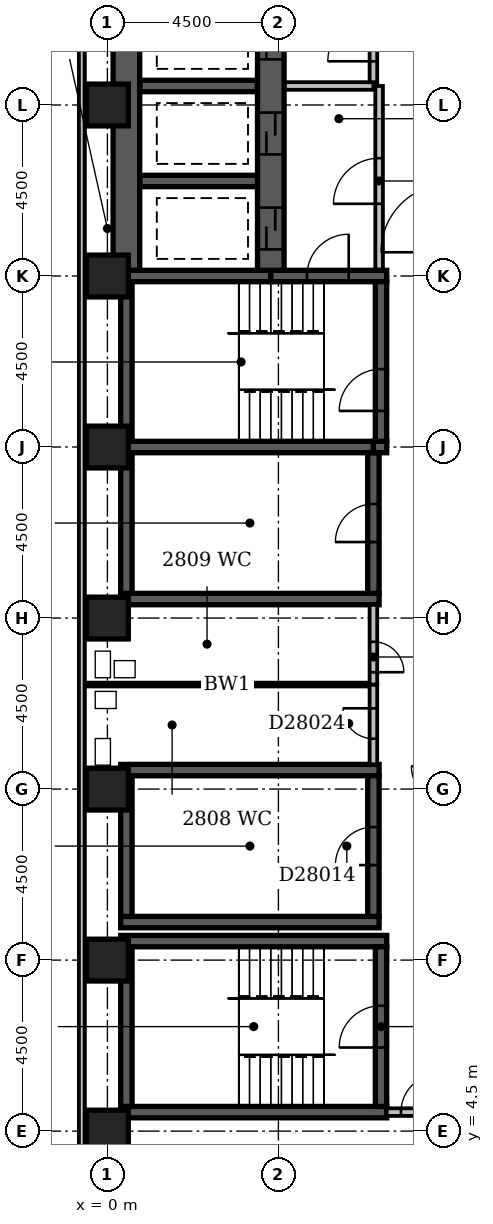
"""IFC4 building model, lengths in metres.
Left out: names, types, materials, properties, quantities, classifications, styles, units other than length and angle.
Written with IfcOpenShell. Run it as: python <this file> out.ifc"""

import sys

from ifc_helpers import new_model, si_unit, direction, frame, frame_2d, origin, origin_2d, place, context, subcontext, project, spatial, rectangle, extrude, element, fill, save


model = new_model("IFC4")
c1 = context("Model", 3, precision=1e-05, world=origin(), true_north=direction((0.0, 1.0)))
c2 = subcontext(c1, "Body", "Model", "MODEL_VIEW")
j1 = project(units=[si_unit("LENGTHUNIT", "METRE"), si_unit("PLANEANGLEUNIT", "RADIAN")], contexts=[c1])
p1 = place(None, origin())
s1 = spatial("IfcSite", under=j1, at=p1, CompositionType="ELEMENT")
p2 = place(p1, origin())
s2 = spatial("IfcBuilding", under=s1, at=p2, CompositionType="ELEMENT")
p3 = place(p2, frame((0.0, 0.0, 113.6)))
s3 = spatial("IfcBuildingStorey", under=s2, at=p3, CompositionType="ELEMENT", Elevation=113.6)
for number, where, z_axis, x_axis in (
    (1, (0.35, 5.0, -0.5), (0.0, 0.0, 1.0), (1.0, 0.0, 0.0)),
    (2, (0.35, 9.5, -0.5), (0.0, 0.0, 1.0), (1.0, 0.0, 0.0)),
):
    element("IfcWall", number, at=place(p3, frame(where, z_axis=z_axis, x_axis=x_axis)), inside=s3, PredefinedType="SHEAR", context=c2, shape_type="SweptSolid", body=[
        extrude(rectangle(XDim=7.0, YDim=0.3, at=frame_2d((3.5, 0.0))), origin(), (0.0, 0.0, 1.0), 6.2),
    ])
for number, where, z_axis, x_axis in (
    (3, (0.35, 10.0, -0.5), (0.0, 0.0, 1.0), (1.0, 0.0, 0.0)),
    (4, (0.35, 14.0, -0.5), (0.0, 0.0, 1.0), (1.0, 0.0, 0.0)),
    (5, (0.35, 18.5, -0.5), (0.0, 0.0, 1.0), (1.0, 0.0, 0.0)),
):
    element("IfcWall", number, at=place(p3, frame(where, z_axis=z_axis, x_axis=x_axis)), inside=s3, PredefinedType="SHEAR", context=c2, shape_type="SweptSolid", body=[
        extrude(rectangle(XDim=6.8, YDim=0.3, at=frame_2d((3.4, 0.0))), origin(), (0.0, 0.0, 1.0), 6.2),
    ])
p4 = place(p3, frame((0.35, 22.5, -0.5), z_axis=(0.0, 0.0, 1.0), x_axis=(1.0, 0.0, 0.0)))
e6 = element("IfcWall", 6, at=p4, inside=s3, PredefinedType="SHEAR", context=c2, shape_type="SweptSolid", body=[
    extrude(rectangle(XDim=6.65, YDim=0.3, at=frame_2d((3.325, 0.0))), origin(), (0.0, 0.0, 1.0), 6.2),
])
p5 = place(p3, frame((0.35, 27.0, -0.5), z_axis=(0.0, 0.0, 1.0), x_axis=(1.0, 0.0, 0.0)))
e7 = element("IfcWall", 7, at=p5, inside=s3, PredefinedType="SHEAR", context=c2, shape_type="SweptSolid", body=[
    extrude(rectangle(XDim=3.95, YDim=0.3, at=frame_2d((1.975, 0.0))), origin(), (0.0, 0.0, 1.0), 6.2),
])
p6 = place(p3, frame((0.5, 5.15, -0.5), z_axis=(0.0, 0.0, 1.0), x_axis=(0.0, 1.0, 0.0)))
e8 = element("IfcWall", 8, at=p6, inside=s3, PredefinedType="SHEAR", context=c2, shape_type="SweptSolid", body=[
    extrude(rectangle(XDim=4.2, YDim=0.3, at=frame_2d((2.1, 0.0))), origin(), (0.0, 0.0, 1.0), 6.2),
])
for number, where, z_axis, x_axis in (
    (9, (0.5, 10.15, -0.5), (0.0, 0.0, 1.0), (0.0, 1.0, 0.0)),
    (10, (0.5, 18.65, -0.5), (0.0, 0.0, 1.0), (0.0, 1.0, 0.0)),
):
    element("IfcWall", number, at=place(p3, frame(where, z_axis=z_axis, x_axis=x_axis)), inside=s3, PredefinedType="SHEAR", context=c2, shape_type="SweptSolid", body=[
        extrude(rectangle(XDim=3.7, YDim=0.3, at=frame_2d((1.85, 0.0))), origin(), (0.0, 0.0, 1.0), 6.2),
    ])
p7 = place(p3, frame((0.5, 22.65, -0.5), z_axis=(0.0, 0.0, 1.0), x_axis=(0.0, 1.0, 0.0)))
e11 = element("IfcWall", 11, at=p7, inside=s3, PredefinedType="SHEAR", context=c2, shape_type="SweptSolid", body=[
    extrude(rectangle(XDim=4.2, YDim=0.3, at=frame_2d((2.1, 0.0))), origin(), (0.0, 0.0, 1.0), 6.2),
])
p8 = place(p3, frame((0.5, 27.15, -0.5), z_axis=(0.0, 0.0, 1.0), x_axis=(0.0, 1.0, 0.0)))
e12 = element("IfcWall", 12, at=p8, inside=s3, PredefinedType="SHEAR", context=c2, shape_type="SweptSolid", body=[
    extrude(rectangle(XDim=22.0, YDim=0.7, at=frame_2d((11.0, 0.0))), origin(), (0.0, 0.0, 1.0), 6.2),
])
for number, where, z_axis, x_axis in (
    (13, (0.85, 29.5, -0.5), (0.0, 0.0, 1.0), (1.0, 0.0, 0.0)),
    (14, (0.85, 32.0, -0.5), (0.0, 0.0, 1.0), (1.0, 0.0, 0.0)),
):
    element("IfcWall", number, at=place(p3, frame(where, z_axis=z_axis, x_axis=x_axis)), inside=s3, PredefinedType="SHEAR", context=c2, shape_type="SweptSolid", body=[
        extrude(rectangle(XDim=3.1, YDim=0.3, at=frame_2d((1.55, 0.0))), origin(), (0.0, 0.0, 1.0), 6.2),
    ])
p9 = place(p3, frame((4.3, 27.0, -0.5), z_axis=(0.0, 0.0, 1.0), x_axis=(1.0, 0.0, 0.0)))
e15 = element("IfcWall", 15, at=p9, inside=s3, PredefinedType="SHEAR", context=c2, shape_type="SweptSolid", body=[
    extrude(rectangle(XDim=3.05, YDim=0.3, at=frame_2d((1.525, 0.0))), origin(), (0.0, 0.0, 1.0), 6.2),
])
p10 = place(p9, frame((0.95, 0.0, 0.5)))
e16 = element("IfcOpeningElement", 16, at=p10, cuts=e15, PredefinedType="OPENING", context=c2, shape_type="SweptSolid", body=[
    extrude(rectangle(XDim=1.1, YDim=2.1, at=frame_2d((0.55, 1.05))), frame((0.0, 0.162, 0.0), z_axis=(0.0, -1.0, 0.0), x_axis=(1.0, 0.0, 0.0)), (0.0, 0.0, 1.0), 0.324),
])
p11 = place(p3, frame((4.3, 27.15, -0.5), z_axis=(0.0, 0.0, 1.0), x_axis=(0.0, 1.0, 0.0)))
e17 = element("IfcWall", 17, at=p11, inside=s3, PredefinedType="SHEAR", context=c2, shape_type="SweptSolid", body=[
    extrude(rectangle(XDim=22.0, YDim=0.7, at=frame_2d((11.0, 0.0))), origin(), (0.0, 0.0, 1.0), 6.2),
])
p12 = place(p11, frame((3.05, 0.0, 0.5)))
e18 = element("IfcOpeningElement", 18, at=p12, cuts=e17, PredefinedType="OPENING", context=c2, shape_type="SweptSolid", body=[
    extrude(rectangle(XDim=1.1, YDim=2.1, at=frame_2d((0.55, 1.05))), frame((0.0, 0.362, 0.0), z_axis=(0.0, -1.0, 0.0), x_axis=(1.0, 0.0, 0.0)), (0.0, 0.0, 1.0), 0.724),
])
p13 = place(p11, frame((0.55, 0.0, 0.5)))
e19 = element("IfcOpeningElement", 19, at=p13, cuts=e17, PredefinedType="OPENING", context=c2, shape_type="SweptSolid", body=[
    extrude(rectangle(XDim=1.1, YDim=2.1, at=frame_2d((0.55, 1.05))), frame((0.0, 0.362, 0.0), z_axis=(0.0, -1.0, 0.0), x_axis=(1.0, 0.0, 0.0)), (0.0, 0.0, 1.0), 0.724),
])
p14 = place(p11, frame((20.45, 0.0, 0.5)))
e20 = element("IfcOpeningElement", 20, at=p14, cuts=e17, PredefinedType="OPENING", context=c2, shape_type="SweptSolid", body=[
    extrude(rectangle(XDim=1.1, YDim=2.1, at=frame_2d((0.55, 1.05))), frame((0.0, 0.362, 0.0), z_axis=(0.0, -1.0, 0.0), x_axis=(1.0, 0.0, 0.0)), (0.0, 0.0, 1.0), 0.724),
])
p15 = place(p11, frame((18.05, 0.0, 0.5)))
e21 = element("IfcOpeningElement", 21, at=p15, cuts=e17, PredefinedType="OPENING", context=c2, shape_type="SweptSolid", body=[
    extrude(rectangle(XDim=1.1, YDim=2.1, at=frame_2d((0.55, 1.05))), frame((0.0, 0.362, 0.0), z_axis=(0.0, -1.0, 0.0), x_axis=(1.0, 0.0, 0.0)), (0.0, 0.0, 1.0), 0.724),
])
p16 = place(p11, frame((15.55, 0.0, 0.5)))
e22 = element("IfcOpeningElement", 22, at=p16, cuts=e17, PredefinedType="OPENING", context=c2, shape_type="SweptSolid", body=[
    extrude(rectangle(XDim=1.1, YDim=2.1, at=frame_2d((0.55, 1.05))), frame((0.0, 0.362, 0.0), z_axis=(0.0, -1.0, 0.0), x_axis=(1.0, 0.0, 0.0)), (0.0, 0.0, 1.0), 0.724),
])
p17 = place(p11, frame((13.05, 0.0, 0.5)))
e23 = element("IfcOpeningElement", 23, at=p17, cuts=e17, PredefinedType="OPENING", context=c2, shape_type="SweptSolid", body=[
    extrude(rectangle(XDim=1.1, YDim=2.1, at=frame_2d((0.55, 1.05))), frame((0.0, 0.362, 0.0), z_axis=(0.0, -1.0, 0.0), x_axis=(1.0, 0.0, 0.0)), (0.0, 0.0, 1.0), 0.724),
])
p18 = place(p11, frame((10.55, 0.0, 0.5)))
e24 = element("IfcOpeningElement", 24, at=p18, cuts=e17, PredefinedType="OPENING", context=c2, shape_type="SweptSolid", body=[
    extrude(rectangle(XDim=1.1, YDim=2.1, at=frame_2d((0.55, 1.05))), frame((0.0, 0.362, 0.0), z_axis=(0.0, -1.0, 0.0), x_axis=(1.0, 0.0, 0.0)), (0.0, 0.0, 1.0), 0.724),
])
p19 = place(p11, frame((8.05, 0.0, 0.5)))
e25 = element("IfcOpeningElement", 25, at=p19, cuts=e17, PredefinedType="OPENING", context=c2, shape_type="SweptSolid", body=[
    extrude(rectangle(XDim=1.1, YDim=2.1, at=frame_2d((0.55, 1.05))), frame((0.0, 0.362, 0.0), z_axis=(0.0, -1.0, 0.0), x_axis=(1.0, 0.0, 0.0)), (0.0, 0.0, 1.0), 0.724),
])
p20 = place(p11, frame((5.55, 0.0, 0.5)))
e26 = element("IfcOpeningElement", 26, at=p20, cuts=e17, PredefinedType="OPENING", context=c2, shape_type="SweptSolid", body=[
    extrude(rectangle(XDim=1.1, YDim=2.1, at=frame_2d((0.55, 1.05))), frame((0.0, 0.362, 0.0), z_axis=(0.0, -1.0, 0.0), x_axis=(1.0, 0.0, 0.0)), (0.0, 0.0, 1.0), 0.724),
])
p21 = place(p3, frame((7.0, 10.15, -0.5), z_axis=(0.0, 0.0, 1.0), x_axis=(0.0, 1.0, 0.0)))
e27 = element("IfcWall", 27, at=p21, inside=s3, PredefinedType="SHEAR", context=c2, shape_type="SweptSolid", body=[
    extrude(rectangle(XDim=3.7, YDim=0.3, at=frame_2d((1.85, 0.0))), origin(), (0.0, 0.0, 1.0), 6.2),
])
p22 = place(p21, frame((1.35, 0.0, 0.5)))
e28 = element("IfcOpeningElement", 28, at=p22, cuts=e27, PredefinedType="OPENING", context=c2, shape_type="SweptSolid", body=[
    extrude(rectangle(XDim=1.0, YDim=2.1, at=frame_2d((0.5, 1.05))), frame((0.0, 0.162, 0.0), z_axis=(0.0, -1.0, 0.0), x_axis=(1.0, 0.0, 0.0)), (0.0, 0.0, 1.0), 0.324),
])
p23 = place(p3, frame((7.0, 18.65, -0.5), z_axis=(0.0, 0.0, 1.0), x_axis=(0.0, 1.0, 0.0)))
e29 = element("IfcWall", 29, at=p23, inside=s3, PredefinedType="SHEAR", context=c2, shape_type="SweptSolid", body=[
    extrude(rectangle(XDim=3.7, YDim=0.3, at=frame_2d((1.85, 0.0))), origin(), (0.0, 0.0, 1.0), 6.2),
])
p24 = place(p23, frame((1.35, 0.0, 0.5)))
e30 = element("IfcOpeningElement", 30, at=p24, cuts=e29, PredefinedType="OPENING", context=c2, shape_type="SweptSolid", body=[
    extrude(rectangle(XDim=1.0, YDim=2.1, at=frame_2d((0.5, 1.05))), frame((0.0, 0.162, 0.0), z_axis=(0.0, -1.0, 0.0), x_axis=(1.0, 0.0, 0.0)), (0.0, 0.0, 1.0), 0.324),
])
p25 = place(p3, frame((7.0, 22.5, -0.5), z_axis=(0.0, 0.0, 1.0), x_axis=(1.0, 0.0, 0.0)))
e31 = element("IfcWall", 31, at=p25, inside=s3, PredefinedType="SHEAR", context=c2, shape_type="SweptSolid", body=[
    extrude(rectangle(XDim=0.35, YDim=0.3, at=frame_2d((0.175, 0.0))), origin(), (0.0, 0.0, 1.0), 6.2),
])
p26 = place(p3, frame((7.2, 5.15, -0.5), z_axis=(0.0, 0.0, 1.0), x_axis=(0.0, 1.0, 0.0)))
e32 = element("IfcWall", 32, at=p26, inside=s3, PredefinedType="SHEAR", context=c2, shape_type="SweptSolid", body=[
    extrude(rectangle(XDim=4.2, YDim=0.3, at=frame_2d((2.1, 0.0))), origin(), (0.0, 0.0, 1.0), 6.2),
])
p27 = place(p26, frame((1.55, 0.0, 0.5)))
e33 = element("IfcOpeningElement", 33, at=p27, cuts=e32, PredefinedType="OPENING", context=c2, shape_type="SweptSolid", body=[
    extrude(rectangle(XDim=1.1, YDim=2.1, at=frame_2d((0.55, 1.05))), frame((0.0, 0.162, 0.0), z_axis=(0.0, -1.0, 0.0), x_axis=(1.0, 0.0, 0.0)), (0.0, 0.0, 1.0), 0.324),
])
p28 = place(p3, frame((7.2, 22.65, -0.5), z_axis=(0.0, 0.0, 1.0), x_axis=(0.0, 1.0, 0.0)))
e34 = element("IfcWall", 34, at=p28, inside=s3, PredefinedType="SHEAR", context=c2, shape_type="SweptSolid", body=[
    extrude(rectangle(XDim=4.2, YDim=0.3, at=frame_2d((2.1, 0.0))), origin(), (0.0, 0.0, 1.0), 6.2),
])
p29 = place(p28, frame((0.8, 0.0, 0.5)))
e35 = element("IfcOpeningElement", 35, at=p29, cuts=e34, PredefinedType="OPENING", context=c2, shape_type="SweptSolid", body=[
    extrude(rectangle(XDim=1.1, YDim=2.1, at=frame_2d((0.55, 1.05))), frame((0.0, 0.162, 0.0), z_axis=(0.0, -1.0, 0.0), x_axis=(1.0, 0.0, 0.0)), (0.0, 0.0, 1.0), 0.324),
])
for number, where, z_axis, x_axis in (
    (36, (0.0, 4.5, -0.5), (0.0, 0.0, 1.0), (1.0, 0.0, 0.0)),
    (37, (0.0, 9.0, -0.5), (0.0, 0.0, 1.0), (1.0, 0.0, 0.0)),
    (38, (0.0, 13.5, -0.5), (0.0, 0.0, 1.0), (1.0, 0.0, 0.0)),
    (39, (0.0, 18.0, -0.5), (0.0, 0.0, 1.0), (1.0, 0.0, 0.0)),
    (40, (0.0, 22.5, -0.5), (0.0, 0.0, 1.0), (1.0, 0.0, 0.0)),
    (41, (0.0, 27.0, -0.5), (0.0, 0.0, 1.0), (1.0, 0.0, 0.0)),
    (42, (0.0, 31.5, -0.5), (0.0, 0.0, 1.0), (1.0, 0.0, 0.0)),
):
    element("IfcColumn", number, at=place(p3, frame(where, z_axis=z_axis, x_axis=x_axis)), inside=s3, PredefinedType="COLUMN", context=c2, shape_type="SweptSolid", body=[
        extrude(rectangle(XDim=1.1, YDim=1.1, at=origin_2d()), origin(), (0.0, 0.0, 1.0), 6.2),
    ])
p30 = place(p3, frame((-0.675, 59.1, 0.0), z_axis=(0.0, 0.0, 1.0), x_axis=(0.0, -1.0, 0.0)))
e43 = element("IfcWall", 43, at=p30, inside=s3, PredefinedType="STANDARD", context=c2, shape_type="SweptSolid", body=[
    extrude(rectangle(XDim=55.35, YDim=0.15, at=frame_2d((27.675, 0.0))), origin(), (0.0, 0.0, 1.0), 1.1),
])
p31 = place(p3, frame((-0.675, 59.1, 1.1), z_axis=(0.0, 0.0, 1.0), x_axis=(0.0, -1.0, 0.0)))
e44 = element("IfcWall", 44, at=p31, inside=s3, PredefinedType="STANDARD", context=c2, shape_type="SweptSolid", body=[
    extrude(rectangle(XDim=55.35, YDim=0.15, at=frame_2d((27.675, 0.0))), origin(), (0.0, 0.0, 1.0), 4.0),
])
p32 = place(p3, frame((4.67, 32.0, 0.0), z_axis=(0.0, 0.0, 1.0), x_axis=(1.0, 0.0, 0.0)))
e45 = element("IfcWall", 45, at=p32, inside=s3, PredefinedType="PARTITIONING", context=c2, shape_type="SweptSolid", body=[
    extrude(rectangle(XDim=2.33, YDim=0.2, at=frame_2d((1.165, 0.0))), origin(), (0.0, 0.0, 1.0), 5.7),
])
p33 = place(p3, frame((7.0, 32.1, 0.0), z_axis=(0.0, 0.0, 1.0), x_axis=(0.0, 1.0, 0.0)))
e46 = element("IfcWall", 46, at=p33, inside=s3, PredefinedType="PARTITIONING", context=c2, shape_type="SweptSolid", body=[
    extrude(rectangle(XDim=2.3, YDim=0.2, at=frame_2d((1.15, 0.0))), origin(), (0.0, 0.0, 1.0), 5.7),
])
p34 = place(p33, frame((0.55, 0.0, 0.0)))
e47 = element("IfcOpeningElement", 47, at=p34, cuts=e46, PredefinedType="OPENING", context=c2, shape_type="SweptSolid", body=[
    extrude(rectangle(XDim=1.2, YDim=2.1, at=frame_2d((0.6, 1.05))), frame((0.0, 0.112, 0.0), z_axis=(0.0, -1.0, 0.0), x_axis=(1.0, 0.0, 0.0)), (0.0, 0.0, 1.0), 0.224),
])
p35 = place(p3, frame((7.15, 27.17, 0.0), z_axis=(0.0, 0.0, 1.0), x_axis=(0.0, 1.0, 0.0)))
e48 = element("IfcWall", 48, at=p35, inside=s3, PredefinedType="PARTITIONING", context=c2, shape_type="SweptSolid", body=[
    extrude(rectangle(XDim=4.83, YDim=0.2, at=frame_2d((2.415, 0.0))), origin(), (0.0, 0.0, 1.0), 5.7),
])
p36 = place(p35, frame((1.73, 0.0, 0.0)))
e49 = element("IfcOpeningElement", 49, at=p36, cuts=e48, PredefinedType="OPENING", context=c2, shape_type="SweptSolid", body=[
    extrude(rectangle(XDim=1.2, YDim=2.1, at=frame_2d((0.6, 1.05))), frame((0.0, 0.112, 0.0), z_axis=(0.0, -1.0, 0.0), x_axis=(1.0, 0.0, 0.0)), (0.0, 0.0, 1.0), 0.224),
])
p37 = place(p3, frame((7.35, 5.0, 0.0), z_axis=(0.0, 0.0, 1.0), x_axis=(1.0, 0.0, 0.0)))
e50 = element("IfcWall", 50, at=p37, inside=s3, PredefinedType="PARTITIONING", context=c2, shape_type="SweptSolid", body=[
    extrude(rectangle(XDim=1.75, YDim=0.2, at=frame_2d((0.875, 0.0))), origin(), (0.0, 0.0, 1.0), 5.7),
])
p38 = place(p37, frame((0.375, 0.0, 0.0)))
e51 = element("IfcOpeningElement", 51, at=p38, cuts=e50, PredefinedType="OPENING", context=c2, shape_type="SweptSolid", body=[
    extrude(rectangle(XDim=1.0, YDim=2.1, at=frame_2d((0.5, 1.05))), frame((0.0, 0.112, 0.0), z_axis=(0.0, -1.0, 0.0), x_axis=(1.0, 0.0, 0.0)), (0.0, 0.0, 1.0), 0.224),
])
p39 = place(p3, frame((-0.6, 16.25, 0.0), z_axis=(0.0, 0.0, 1.0), x_axis=(1.0, 0.0, 0.0)))
e52 = element("IfcWall", 52, at=p39, inside=s3, PredefinedType="PLUMBINGWALL", context=c2, shape_type="SweptSolid", body=[
    extrude(rectangle(XDim=7.5, YDim=0.1, at=frame_2d((3.75, 0.0))), origin(), (0.0, 0.0, 1.0), 5.7),
])
p40 = place(p3, frame((7.0, 16.25, 0.0), z_axis=(0.0, 0.0, 1.0), x_axis=(0.0, -1.0, 0.0)))
e53 = element("IfcWall", 53, at=p40, inside=s3, PredefinedType="PARTITIONING", context=c2, shape_type="SweptSolid", body=[
    extrude(rectangle(XDim=2.1, YDim=0.2, at=frame_2d((1.05, 0.0))), origin(), (0.0, 0.0, 1.0), 5.7),
])
p41 = place(p40, frame((0.625, 0.0, 0.0)))
e54 = element("IfcOpeningElement", 54, at=p41, cuts=e53, PredefinedType="OPENING", context=c2, shape_type="SweptSolid", body=[
    extrude(rectangle(XDim=0.8, YDim=2.1, at=frame_2d((0.4, 1.05))), frame((0.0, 0.112, 0.0), z_axis=(0.0, -1.0, 0.0), x_axis=(1.0, 0.0, 0.0)), (0.0, 0.0, 1.0), 0.224),
])
p42 = place(p3, frame((7.0, 18.35, 0.0), z_axis=(0.0, 0.0, 1.0), x_axis=(0.0, -1.0, 0.0)))
e55 = element("IfcWall", 55, at=p42, inside=s3, PredefinedType="PARTITIONING", context=c2, shape_type="SweptSolid", body=[
    extrude(rectangle(XDim=2.1, YDim=0.2, at=frame_2d((1.05, 0.0))), origin(), (0.0, 0.0, 1.0), 5.7),
])
p43 = place(p42, frame((0.975, 0.0, 0.0)))
e56 = element("IfcOpeningElement", 56, at=p43, cuts=e55, PredefinedType="OPENING", context=c2, shape_type="SweptSolid", body=[
    extrude(rectangle(XDim=0.8, YDim=2.1, at=frame_2d((0.4, 1.05))), frame((0.0, 0.112, 0.0), z_axis=(0.0, -1.0, 0.0), x_axis=(1.0, 0.0, 0.0)), (0.0, 0.0, 1.0), 0.224),
])
p44 = place(p36, origin())
e57 = element("IfcDoor", 57, at=p44, inside=s3, OperationType="SINGLE_SWING_LEFT", PredefinedType="DOOR", context=c2, shape_type="SweptSolid", body=[
    extrude(rectangle(XDim=1.2, YDim=2.1, at=frame_2d((0.6, 1.05))), frame((0.0, 0.025, 0.0), z_axis=(0.0, -1.0, 0.0), x_axis=(1.0, 0.0, 0.0)), (0.0, 0.0, 1.0), 0.05),
])
fill(e49, e57)
p45 = place(p12, origin())
e58 = element("IfcDoor", 58, at=p45, inside=s3, OperationType="SLIDING_TO_LEFT", PredefinedType="DOOR", context=c2, shape_type="SweptSolid", body=[
    extrude(rectangle(XDim=1.1, YDim=2.1, at=frame_2d((0.55, 1.05))), frame((0.0, 0.025, 0.0), z_axis=(0.0, -1.0, 0.0), x_axis=(1.0, 0.0, 0.0)), (0.0, 0.0, 1.0), 0.05),
])
fill(e18, e58)
p46 = place(p13, origin())
e59 = element("IfcDoor", 59, at=p46, inside=s3, OperationType="SLIDING_TO_LEFT", PredefinedType="DOOR", context=c2, shape_type="SweptSolid", body=[
    extrude(rectangle(XDim=1.1, YDim=2.1, at=frame_2d((0.55, 1.05))), frame((0.0, 0.025, 0.0), z_axis=(0.0, -1.0, 0.0), x_axis=(1.0, 0.0, 0.0)), (0.0, 0.0, 1.0), 0.05),
])
fill(e19, e59)
p47 = place(p34, origin())
e60 = element("IfcDoor", 60, at=p47, inside=s3, OperationType="SINGLE_SWING_LEFT", PredefinedType="DOOR", context=c2, shape_type="SweptSolid", body=[
    extrude(rectangle(XDim=1.2, YDim=2.1, at=frame_2d((0.6, 1.05))), frame((0.0, 0.025, 0.0), z_axis=(0.0, -1.0, 0.0), x_axis=(1.0, 0.0, 0.0)), (0.0, 0.0, 1.0), 0.05),
])
fill(e47, e60)
p48 = place(p20, origin())
e61 = element("IfcDoor", 61, at=p48, inside=s3, OperationType="SLIDING_TO_LEFT", PredefinedType="DOOR", context=c2, shape_type="SweptSolid", body=[
    extrude(rectangle(XDim=1.1, YDim=2.1, at=frame_2d((0.55, 1.05))), frame((0.0, 0.025, 0.0), z_axis=(0.0, -1.0, 0.0), x_axis=(1.0, 0.0, 0.0)), (0.0, 0.0, 1.0), 0.05),
])
fill(e26, e61)
p49 = place(p24, origin())
e62 = element("IfcDoor", 62, at=p49, inside=s3, OperationType="SINGLE_SWING_LEFT", PredefinedType="DOOR", context=c2, shape_type="SweptSolid", body=[
    extrude(rectangle(XDim=1.0, YDim=2.1, at=frame_2d((0.5, 1.05))), frame((0.0, 0.025, 0.0), z_axis=(0.0, -1.0, 0.0), x_axis=(1.0, 0.0, 0.0)), (0.0, 0.0, 1.0), 0.05),
])
fill(e30, e62)
p50 = place(p22, origin())
e63 = element("IfcDoor", 63, at=p50, inside=s3, OperationType="SINGLE_SWING_LEFT", PredefinedType="DOOR", context=c2, shape_type="SweptSolid", body=[
    extrude(rectangle(XDim=1.0, YDim=2.1, at=frame_2d((0.5, 1.05))), frame((0.0, 0.025, 0.0), z_axis=(0.0, -1.0, 0.0), x_axis=(1.0, 0.0, 0.0)), (0.0, 0.0, 1.0), 0.05),
])
fill(e28, e63)
p51 = place(p10, frame((1.1, 0.0, 0.0), z_axis=(0.0, 0.0, 1.0), x_axis=(-1.0, 0.0, 0.0)))
e64 = element("IfcDoor", 64, at=p51, inside=s3, OperationType="SINGLE_SWING_LEFT", PredefinedType="DOOR", context=c2, shape_type="SweptSolid", body=[
    extrude(rectangle(XDim=1.1, YDim=2.1, at=frame_2d((0.55, 1.05))), frame((0.0, 0.025, 0.0), z_axis=(0.0, -1.0, 0.0), x_axis=(1.0, 0.0, 0.0)), (0.0, 0.0, 1.0), 0.05),
])
fill(e16, e64)
p52 = place(p29, origin())
e65 = element("IfcDoor", 65, at=p52, inside=s3, OperationType="SINGLE_SWING_LEFT", PredefinedType="DOOR", context=c2, shape_type="SweptSolid", body=[
    extrude(rectangle(XDim=1.1, YDim=2.1, at=frame_2d((0.55, 1.05))), frame((0.0, 0.025, 0.0), z_axis=(0.0, -1.0, 0.0), x_axis=(1.0, 0.0, 0.0)), (0.0, 0.0, 1.0), 0.05),
])
fill(e35, e65)
p53 = place(p27, origin())
e66 = element("IfcDoor", 66, at=p53, inside=s3, OperationType="SINGLE_SWING_LEFT", PredefinedType="DOOR", context=c2, shape_type="SweptSolid", body=[
    extrude(rectangle(XDim=1.1, YDim=2.1, at=frame_2d((0.55, 1.05))), frame((0.0, 0.025, 0.0), z_axis=(0.0, -1.0, 0.0), x_axis=(1.0, 0.0, 0.0)), (0.0, 0.0, 1.0), 0.05),
])
fill(e33, e66)
p54 = place(p38, frame((1.0, 0.0, 0.0), z_axis=(0.0, 0.0, 1.0), x_axis=(-1.0, 0.0, 0.0)))
e67 = element("IfcDoor", 67, at=p54, inside=s3, OperationType="SINGLE_SWING_LEFT", PredefinedType="DOOR", context=c2, shape_type="SweptSolid", body=[
    extrude(rectangle(XDim=1.0, YDim=2.1, at=frame_2d((0.5, 1.05))), frame((0.0, 0.025, 0.0), z_axis=(0.0, -1.0, 0.0), x_axis=(1.0, 0.0, 0.0)), (0.0, 0.0, 1.0), 0.05),
])
fill(e51, e67)
p55 = place(p41, frame((0.8, 0.0, 0.0), z_axis=(0.0, 0.0, 1.0), x_axis=(-1.0, 0.0, 0.0)))
e68 = element("IfcDoor", 68, at=p55, inside=s3, OperationType="SINGLE_SWING_RIGHT", PredefinedType="DOOR", context=c2, shape_type="SweptSolid", body=[
    extrude(rectangle(XDim=0.8, YDim=2.1, at=frame_2d((0.4, 1.05))), frame((0.0, 0.025, 0.0), z_axis=(0.0, -1.0, 0.0), x_axis=(1.0, 0.0, 0.0)), (0.0, 0.0, 1.0), 0.05),
])
fill(e54, e68)
p56 = place(p43, frame((0.8, 0.0, 0.0), z_axis=(0.0, 0.0, 1.0), x_axis=(-1.0, 0.0, 0.0)))
e69 = element("IfcDoor", 69, at=p56, inside=s3, OperationType="SINGLE_SWING_LEFT", PredefinedType="DOOR", context=c2, shape_type="SweptSolid", body=[
    extrude(rectangle(XDim=0.8, YDim=2.1, at=frame_2d((0.4, 1.05))), frame((0.0, 0.025, 0.0), z_axis=(0.0, -1.0, 0.0), x_axis=(1.0, 0.0, 0.0)), (0.0, 0.0, 1.0), 0.05),
])
fill(e56, e69)
save(model, sys.argv[1])
